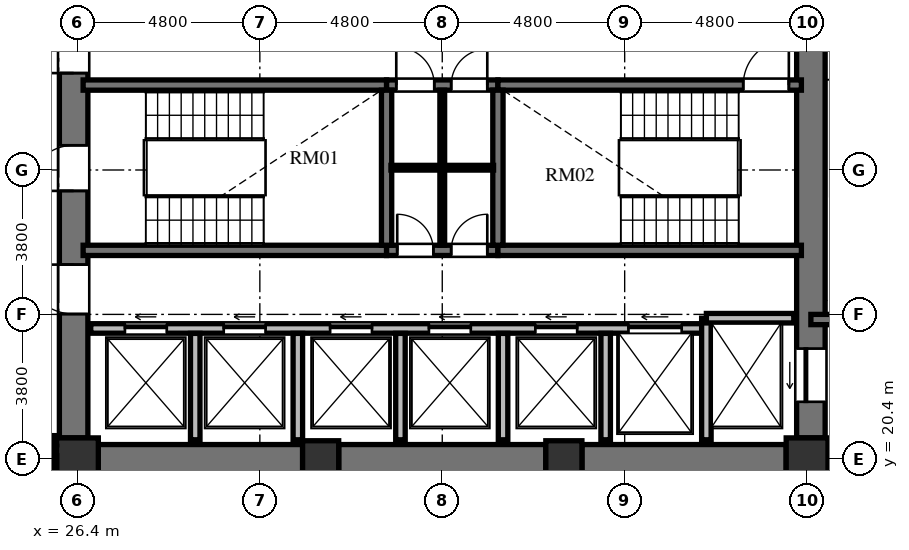
"""IFC4 building model, lengths in metres.
Left out: names, types, materials, properties, quantities, classifications, styles, units other than length and angle.
Written with IfcOpenShell. Run it as: python <this file> out.ifc"""

import sys

from ifc_helpers import new_model, si_unit, direction, frame, frame_2d, origin, origin_2d, place, context, subcontext, project, spatial, rectangle, extrude, element, fill, save


model = new_model("IFC4")
c1 = context("Model", 3, precision=1e-05, world=origin(), true_north=direction((0.0, 1.0)))
c2 = subcontext(c1, "Body", "Model", "MODEL_VIEW")
j1 = project(units=[si_unit("LENGTHUNIT", "METRE"), si_unit("PLANEANGLEUNIT", "RADIAN")], contexts=[c1])
p1 = place(None, origin())
s1 = spatial("IfcSite", under=j1, at=p1, CompositionType="ELEMENT")
p2 = place(p1, origin())
s2 = spatial("IfcBuilding", under=s1, at=p2, CompositionType="ELEMENT")
p3 = place(p2, frame((0.0, 0.0, 92.688)))
s3 = spatial("IfcBuildingStorey", under=s2, at=p3, CompositionType="ELEMENT", Elevation=92.688)
p4 = place(p3, frame((26.4, 20.4, 0.0), z_axis=(0.0, 0.0, 1.0), x_axis=(1.0, 0.0, 0.0)))
e1 = element("IfcColumn", 1, at=p4, inside=s3, PredefinedType="COLUMN", context=c2, shape_type="SweptSolid", body=[
    extrude(rectangle(XDim=1.1, YDim=1.1, at=origin_2d()), origin(), (0.0, 0.0, 1.0), 3.648),
])
for number, where, z_axis, x_axis in (
    (2, (32.8, 20.4, 0.0), (0.0, 0.0, 1.0), (1.0, 0.0, 0.0)),
    (3, (39.2, 20.4, 0.0), (0.0, 0.0, 1.0), (1.0, 0.0, 0.0)),
):
    element("IfcColumn", number, at=place(p3, frame(where, z_axis=z_axis, x_axis=x_axis)), inside=s3, PredefinedType="COLUMN", context=c2, shape_type="SweptSolid", body=[
        extrude(rectangle(XDim=0.95, YDim=0.95, at=origin_2d()), origin(), (0.0, 0.0, 1.0), 3.648),
    ])
p5 = place(p3, frame((45.6, 20.4, 0.0), z_axis=(0.0, 0.0, 1.0), x_axis=(1.0, 0.0, 0.0)))
e4 = element("IfcColumn", 4, at=p5, inside=s3, PredefinedType="COLUMN", context=c2, shape_type="SweptSolid", body=[
    extrude(rectangle(XDim=1.1, YDim=1.1, at=origin_2d()), origin(), (0.0, 0.0, 1.0), 3.648),
])
p6 = place(p3, frame((26.3, 20.95, 0.0), z_axis=(0.0, 0.0, 1.0), x_axis=(0.0, 1.0, 0.0)))
e5 = element("IfcWall", 5, at=p6, inside=s3, PredefinedType="SHEAR", context=c2, shape_type="SweptSolid", body=[
    extrude(rectangle(XDim=14.1, YDim=0.75, at=frame_2d((7.05, 0.0))), origin(), (0.0, 0.0, 1.0), 3.648),
])
p7 = place(p6, frame((6.5, 0.0, 0.0)))
e6 = element("IfcOpeningElement", 6, at=p7, cuts=e5, PredefinedType="OPENING", context=c2, shape_type="SweptSolid", body=[
    extrude(rectangle(XDim=1.2, YDim=2.15, at=frame_2d((0.6, 1.075))), frame((0.0, 0.385, 0.0), z_axis=(0.0, -1.0, 0.0), x_axis=(1.0, 0.0, 0.0)), (0.0, 0.0, 1.0), 0.77),
])
p8 = place(p6, frame((9.6, 0.0, 0.0)))
e7 = element("IfcOpeningElement", 7, at=p8, cuts=e5, PredefinedType="OPENING", context=c2, shape_type="SweptSolid", body=[
    extrude(rectangle(XDim=1.3, YDim=2.2, at=frame_2d((0.65, 1.1))), frame((0.0, 0.385, 0.0), z_axis=(0.0, -1.0, 0.0), x_axis=(1.0, 0.0, 0.0)), (0.0, 0.0, 1.0), 0.77),
])
p9 = place(p6, frame((3.26, 0.0, 0.0)))
e8 = element("IfcOpeningElement", 8, at=p9, cuts=e5, PredefinedType="OPENING", context=c2, shape_type="SweptSolid", body=[
    extrude(rectangle(XDim=1.3, YDim=2.2, at=frame_2d((0.65, 1.1))), frame((0.0, 0.385, 0.0), z_axis=(0.0, -1.0, 0.0), x_axis=(1.0, 0.0, 0.0)), (0.0, 0.0, 1.0), 0.77),
])
p10 = place(p3, frame((45.7, 20.95, 0.0), z_axis=(0.0, 0.0, 1.0), x_axis=(0.0, 1.0, 0.0)))
e9 = element("IfcWall", 9, at=p10, inside=s3, PredefinedType="SHEAR", context=c2, shape_type="SweptSolid", body=[
    extrude(rectangle(XDim=14.1, YDim=0.75, at=frame_2d((7.05, 0.0))), origin(), (0.0, 0.0, 1.0), 3.648),
])
p11 = place(p10, frame((11.75, 0.0, 0.0)))
e10 = element("IfcOpeningElement", 10, at=p11, cuts=e9, PredefinedType="OPENING", context=c2, shape_type="SweptSolid", body=[
    extrude(rectangle(XDim=1.4, YDim=2.3, at=frame_2d((0.7, 1.15))), frame((0.0, 0.385, 0.0), z_axis=(0.0, -1.0, 0.0), x_axis=(1.0, 0.0, 0.0)), (0.0, 0.0, 1.0), 0.77),
])
p12 = place(p10, frame((0.95, 0.0, 0.0)))
e11 = element("IfcOpeningElement", 11, at=p12, cuts=e9, PredefinedType="OPENING", context=c2, shape_type="SweptSolid", body=[
    extrude(rectangle(XDim=1.4, YDim=2.3, at=frame_2d((0.7, 1.15))), frame((0.0, 0.385, 0.0), z_axis=(0.0, -1.0, 0.0), x_axis=(1.0, 0.0, 0.0)), (0.0, 0.0, 1.0), 0.77),
])
p13 = place(p3, frame((26.95, 20.4, 0.0), z_axis=(0.0, 0.0, 1.0), x_axis=(1.0, 0.0, 0.0)))
e12 = element("IfcWall", 12, at=p13, inside=s3, PredefinedType="SHEAR", context=c2, shape_type="SweptSolid", body=[
    extrude(rectangle(XDim=5.375, YDim=0.75, at=frame_2d((2.688, 0.0))), origin(), (0.0, 0.0, 1.0), 3.648),
])
p14 = place(p3, frame((33.275, 20.4, 0.0), z_axis=(0.0, 0.0, 1.0), x_axis=(1.0, 0.0, 0.0)))
e13 = element("IfcWall", 13, at=p14, inside=s3, PredefinedType="SHEAR", context=c2, shape_type="SweptSolid", body=[
    extrude(rectangle(XDim=5.45, YDim=0.75, at=frame_2d((2.725, 0.0))), origin(), (0.0, 0.0, 1.0), 3.648),
])
p15 = place(p3, frame((39.675, 20.4, 0.0), z_axis=(0.0, 0.0, 1.0), x_axis=(1.0, 0.0, 0.0)))
e14 = element("IfcWall", 14, at=p15, inside=s3, PredefinedType="SHEAR", context=c2, shape_type="SweptSolid", body=[
    extrude(rectangle(XDim=5.375, YDim=0.75, at=frame_2d((2.688, 0.0))), origin(), (0.0, 0.0, 1.0), 3.648),
])
p16 = place(p3, frame((26.55, 30.235, 0.0), z_axis=(0.0, 0.0, 1.0), x_axis=(1.0, 0.0, 0.0)))
e15 = element("IfcWall", 15, at=p16, inside=s3, PredefinedType="SHEAR", context=c2, shape_type="SweptSolid", body=[
    extrude(rectangle(XDim=7.985, YDim=0.27, at=frame_2d((3.992, 0.0))), origin(), (0.0, 0.0, 1.0), 3.648),
])
p17 = place(p3, frame((34.535, 30.235, 0.0), z_axis=(0.0, 0.0, 1.0), x_axis=(1.0, 0.0, 0.0)))
e16 = element("IfcWall", 16, at=p17, inside=s3, PredefinedType="SHEAR", context=c2, shape_type="SweptSolid", body=[
    extrude(rectangle(XDim=2.93, YDim=0.27, at=frame_2d((1.465, 0.0))), origin(), (0.0, 0.0, 1.0), 3.648),
])
p18 = place(p17, frame((0.255, 0.0, 0.0)))
e17 = element("IfcOpeningElement", 17, at=p18, cuts=e16, PredefinedType="OPENING", context=c2, shape_type="SweptSolid", body=[
    extrude(rectangle(XDim=1.0, YDim=2.1, at=frame_2d((0.5, 1.05))), frame((0.0, 0.145, 0.0), z_axis=(0.0, -1.0, 0.0), x_axis=(1.0, 0.0, 0.0)), (0.0, 0.0, 1.0), 0.29),
])
p19 = place(p17, frame((1.7, 0.0, 0.0)))
e18 = element("IfcOpeningElement", 18, at=p19, cuts=e16, PredefinedType="OPENING", context=c2, shape_type="SweptSolid", body=[
    extrude(rectangle(XDim=0.95, YDim=2.1, at=frame_2d((0.475, 1.05))), frame((0.0, 0.145, 0.0), z_axis=(0.0, -1.0, 0.0), x_axis=(1.0, 0.0, 0.0)), (0.0, 0.0, 1.0), 0.29),
])
p20 = place(p3, frame((37.465, 30.235, 0.0), z_axis=(0.0, 0.0, 1.0), x_axis=(1.0, 0.0, 0.0)))
e19 = element("IfcWall", 19, at=p20, inside=s3, PredefinedType="SHEAR", context=c2, shape_type="SweptSolid", body=[
    extrude(rectangle(XDim=7.985, YDim=0.27, at=frame_2d((3.992, 0.0))), origin(), (0.0, 0.0, 1.0), 3.648),
])
p21 = place(p20, frame((6.455, 0.0, 0.0)))
e20 = element("IfcOpeningElement", 20, at=p21, cuts=e19, PredefinedType="OPENING", context=c2, shape_type="SweptSolid", body=[
    extrude(rectangle(XDim=1.2, YDim=2.15, at=frame_2d((0.6, 1.075))), frame((0.0, 0.145, 0.0), z_axis=(0.0, -1.0, 0.0), x_axis=(1.0, 0.0, 0.0)), (0.0, 0.0, 1.0), 0.29),
])
p22 = place(p3, frame((26.55, 25.885, 0.0), z_axis=(0.0, 0.0, 1.0), x_axis=(1.0, 0.0, 0.0)))
e21 = element("IfcWall", 21, at=p22, inside=s3, PredefinedType="SHEAR", context=c2, shape_type="SweptSolid", body=[
    extrude(rectangle(XDim=7.985, YDim=0.27, at=frame_2d((3.992, 0.0))), origin(), (0.0, 0.0, 1.0), 3.648),
])
p23 = place(p3, frame((34.535, 25.885, 0.0), z_axis=(0.0, 0.0, 1.0), x_axis=(1.0, 0.0, 0.0)))
e22 = element("IfcWall", 22, at=p23, inside=s3, PredefinedType="SHEAR", context=c2, shape_type="SweptSolid", body=[
    extrude(rectangle(XDim=2.93, YDim=0.27, at=frame_2d((1.465, 0.0))), origin(), (0.0, 0.0, 1.0), 3.648),
])
p24 = place(p23, frame((0.28, 0.0, 0.0)))
e23 = element("IfcOpeningElement", 23, at=p24, cuts=e22, PredefinedType="OPENING", context=c2, shape_type="SweptSolid", body=[
    extrude(rectangle(XDim=0.95, YDim=2.1, at=frame_2d((0.475, 1.05))), frame((0.0, 0.145, 0.0), z_axis=(0.0, -1.0, 0.0), x_axis=(1.0, 0.0, 0.0)), (0.0, 0.0, 1.0), 0.29),
])
p25 = place(p23, frame((1.7, 0.0, 0.0)))
e24 = element("IfcOpeningElement", 24, at=p25, cuts=e22, PredefinedType="OPENING", context=c2, shape_type="SweptSolid", body=[
    extrude(rectangle(XDim=0.95, YDim=2.1, at=frame_2d((0.475, 1.05))), frame((0.0, 0.145, 0.0), z_axis=(0.0, -1.0, 0.0), x_axis=(1.0, 0.0, 0.0)), (0.0, 0.0, 1.0), 0.29),
])
p26 = place(p3, frame((37.465, 25.885, 0.0), z_axis=(0.0, 0.0, 1.0), x_axis=(1.0, 0.0, 0.0)))
e25 = element("IfcWall", 25, at=p26, inside=s3, PredefinedType="SHEAR", context=c2, shape_type="SweptSolid", body=[
    extrude(rectangle(XDim=7.985, YDim=0.27, at=frame_2d((3.992, 0.0))), origin(), (0.0, 0.0, 1.0), 3.648),
])
for number, where, z_axis, x_axis in (
    (26, (34.535, 26.02, 0.0), (0.0, 0.0, 1.0), (0.0, 1.0, 0.0)),
    (27, (37.465, 26.02, 0.0), (0.0, 0.0, 1.0), (0.0, 1.0, 0.0)),
):
    element("IfcWall", number, at=place(p3, frame(where, z_axis=z_axis, x_axis=x_axis)), inside=s3, PredefinedType="SHEAR", context=c2, shape_type="SweptSolid", body=[
        extrude(rectangle(XDim=4.08, YDim=0.27, at=frame_2d((2.04, 0.0))), origin(), (0.0, 0.0, 1.0), 3.648),
    ])
p27 = place(p3, frame((34.65, 28.06, 0.0), z_axis=(0.0, 0.0, 1.0), x_axis=(1.0, 0.0, 0.0)))
e28 = element("IfcWall", 28, at=p27, inside=s3, PredefinedType="PARTITIONING", context=c2, shape_type="SweptSolid", body=[
    extrude(rectangle(XDim=2.7, YDim=0.125, at=frame_2d((1.35, 0.0))), origin(), (0.0, 0.0, 1.0), 3.428),
])
p28 = place(p3, frame((36.0, 26.02, 0.0), z_axis=(0.0, 0.0, 1.0), x_axis=(0.0, 1.0, 0.0)))
e29 = element("IfcWall", 29, at=p28, inside=s3, PredefinedType="PARTITIONING", context=c2, shape_type="SweptSolid", body=[
    extrude(rectangle(XDim=4.08, YDim=0.125, at=frame_2d((2.04, 0.0))), origin(), (0.0, 0.0, 1.0), 3.428),
])
p29 = place(p3, frame((26.75, 23.83, 0.0), z_axis=(0.0, 0.0, 1.0), x_axis=(1.0, 0.0, 0.0)))
e30 = element("IfcWall", 30, at=p29, inside=s3, PredefinedType="SOLIDWALL", context=c2, shape_type="SweptSolid", body=[
    extrude(rectangle(XDim=16.2, YDim=0.25, at=frame_2d((8.1, 0.0))), origin(), (0.0, 0.0, 1.0), 3.428),
])
p30 = place(p29, frame((0.9, 0.0, 0.0)))
e31 = element("IfcOpeningElement", 31, at=p30, cuts=e30, PredefinedType="OPENING", context=c2, shape_type="SweptSolid", body=[
    extrude(rectangle(XDim=1.1, YDim=2.2, at=frame_2d((0.55, 1.1))), frame((0.0, 0.135, 0.0), z_axis=(0.0, -1.0, 0.0), x_axis=(1.0, 0.0, 0.0)), (0.0, 0.0, 1.0), 0.27),
])
p31 = place(p29, frame((3.5, 0.0, 0.0)))
e32 = element("IfcOpeningElement", 32, at=p31, cuts=e30, PredefinedType="OPENING", context=c2, shape_type="SweptSolid", body=[
    extrude(rectangle(XDim=1.1, YDim=2.2, at=frame_2d((0.55, 1.1))), frame((0.0, 0.135, 0.0), z_axis=(0.0, -1.0, 0.0), x_axis=(1.0, 0.0, 0.0)), (0.0, 0.0, 1.0), 0.27),
])
p32 = place(p29, frame((6.3, 0.0, 0.0)))
e33 = element("IfcOpeningElement", 33, at=p32, cuts=e30, PredefinedType="OPENING", context=c2, shape_type="SweptSolid", body=[
    extrude(rectangle(XDim=1.1, YDim=2.2, at=frame_2d((0.55, 1.1))), frame((0.0, 0.135, 0.0), z_axis=(0.0, -1.0, 0.0), x_axis=(1.0, 0.0, 0.0)), (0.0, 0.0, 1.0), 0.27),
])
p33 = place(p29, frame((8.9, 0.0, 0.0)))
e34 = element("IfcOpeningElement", 34, at=p33, cuts=e30, PredefinedType="OPENING", context=c2, shape_type="SweptSolid", body=[
    extrude(rectangle(XDim=1.1, YDim=2.2, at=frame_2d((0.55, 1.1))), frame((0.0, 0.135, 0.0), z_axis=(0.0, -1.0, 0.0), x_axis=(1.0, 0.0, 0.0)), (0.0, 0.0, 1.0), 0.27),
])
p34 = place(p29, frame((11.7, 0.0, 0.0)))
e35 = element("IfcOpeningElement", 35, at=p34, cuts=e30, PredefinedType="OPENING", context=c2, shape_type="SweptSolid", body=[
    extrude(rectangle(XDim=1.1, YDim=2.2, at=frame_2d((0.55, 1.1))), frame((0.0, 0.135, 0.0), z_axis=(0.0, -1.0, 0.0), x_axis=(1.0, 0.0, 0.0)), (0.0, 0.0, 1.0), 0.27),
])
p35 = place(p29, frame((14.15, 0.0, 0.0)))
e36 = element("IfcOpeningElement", 36, at=p35, cuts=e30, PredefinedType="OPENING", context=c2, shape_type="SweptSolid", body=[
    extrude(rectangle(XDim=1.4, YDim=2.3, at=frame_2d((0.7, 1.15))), frame((0.0, 0.135, 0.0), z_axis=(0.0, -1.0, 0.0), x_axis=(1.0, 0.0, 0.0)), (0.0, 0.0, 1.0), 0.27),
])
p36 = place(p3, frame((42.95, 20.9, 0.0), z_axis=(0.0, 0.0, 1.0), x_axis=(0.0, 1.0, 0.0)))
e37 = element("IfcWall", 37, at=p36, inside=s3, PredefinedType="SOLIDWALL", context=c2, shape_type="SweptSolid", body=[
    extrude(rectangle(XDim=3.2, YDim=0.25, at=frame_2d((1.6, 0.0))), origin(), (0.0, 0.0, 1.0), 3.428),
])
p37 = place(p3, frame((42.95, 24.1, 0.0), z_axis=(0.0, 0.0, 1.0), x_axis=(1.0, 0.0, 0.0)))
e38 = element("IfcWall", 38, at=p37, inside=s3, PredefinedType="SOLIDWALL", context=c2, shape_type="SweptSolid", body=[
    extrude(rectangle(XDim=2.3, YDim=0.25, at=frame_2d((1.15, 0.0))), origin(), (0.0, 0.0, 1.0), 3.428),
])
for number, where, z_axis, x_axis in (
    (39, (29.5, 20.9, 0.0), (0.0, 0.0, 1.0), (0.0, 1.0, 0.0)),
    (40, (32.2, 20.9, 0.0), (0.0, 0.0, 1.0), (0.0, 1.0, 0.0)),
    (41, (34.9, 20.9, 0.0), (0.0, 0.0, 1.0), (0.0, 1.0, 0.0)),
    (42, (37.6, 20.9, 0.0), (0.0, 0.0, 1.0), (0.0, 1.0, 0.0)),
    (43, (40.3, 20.9, 0.0), (0.0, 0.0, 1.0), (0.0, 1.0, 0.0)),
):
    element("IfcWall", number, at=place(p3, frame(where, z_axis=z_axis, x_axis=x_axis)), inside=s3, PredefinedType="SOLIDWALL", context=c2, shape_type="SweptSolid", body=[
        extrude(rectangle(XDim=2.8, YDim=0.25, at=frame_2d((1.4, 0.0))), origin(), (0.0, 0.0, 1.0), 3.428),
    ])
p38 = place(p3, frame((45.7, 24.065, 0.0), z_axis=(0.0, 0.0, 1.0), x_axis=(1.0, 0.0, 0.0)))
e44 = element("IfcWall", 44, at=p38, inside=s3, PredefinedType="SHEAR", context=c2, shape_type="SweptSolid", body=[
    extrude(rectangle(XDim=4.715, YDim=0.27, at=frame_2d((2.357, 0.0))), origin(), (0.0, 0.0, 1.0), 3.648),
])
p39 = place(p3, frame((45.7, 20.02, 0.0), z_axis=(0.0, 0.0, 1.0), x_axis=(1.0, 0.0, 0.0)))
e45 = element("IfcWall", 45, at=p39, inside=s3, PredefinedType="SOLIDWALL", context=c2, shape_type="SweptSolid", body=[
    extrude(rectangle(XDim=4.715, YDim=0.25, at=frame_2d((2.357, 0.0))), origin(), (0.0, 0.0, 1.0), 3.428),
])
p40 = place(p3, frame((25.83, 21.01, 0.0), z_axis=(0.0, 0.0, 1.0), x_axis=(0.0, -1.0, 0.0)))
e46 = element("IfcWall", 46, at=p40, inside=s3, PredefinedType="PARTITIONING", context=c2, shape_type="SweptSolid", body=[
    extrude(rectangle(XDim=1.22, YDim=0.18, at=frame_2d((0.61, 0.0))), origin(), (0.0, 0.0, 1.0), 3.428),
])
p41 = place(p7, origin())
e47 = element("IfcDoor", 47, at=p41, inside=s3, OperationType="SINGLE_SWING_LEFT", PredefinedType="DOOR", context=c2, shape_type="SweptSolid", body=[
    extrude(rectangle(XDim=1.2, YDim=2.15, at=frame_2d((0.6, 1.075))), frame((0.0, 0.025, 0.0), z_axis=(0.0, -1.0, 0.0), x_axis=(1.0, 0.0, 0.0)), (0.0, 0.0, 1.0), 0.05),
])
fill(e6, e47)
p42 = place(p21, origin())
e48 = element("IfcDoor", 48, at=p42, inside=s3, OperationType="SINGLE_SWING_RIGHT", PredefinedType="DOOR", context=c2, shape_type="SweptSolid", body=[
    extrude(rectangle(XDim=1.2, YDim=2.15, at=frame_2d((0.6, 1.075))), frame((0.0, 0.025, 0.0), z_axis=(0.0, -1.0, 0.0), x_axis=(1.0, 0.0, 0.0)), (0.0, 0.0, 1.0), 0.05),
])
fill(e20, e48)
p43 = place(p24, origin())
e49 = element("IfcDoor", 49, at=p43, inside=s3, OperationType="SINGLE_SWING_LEFT", PredefinedType="DOOR", context=c2, shape_type="SweptSolid", body=[
    extrude(rectangle(XDim=0.95, YDim=2.1, at=frame_2d((0.475, 1.05))), frame((0.0, 0.025, 0.0), z_axis=(0.0, -1.0, 0.0), x_axis=(1.0, 0.0, 0.0)), (0.0, 0.0, 1.0), 0.05),
])
fill(e23, e49)
p44 = place(p25, origin())
e50 = element("IfcDoor", 50, at=p44, inside=s3, OperationType="SINGLE_SWING_RIGHT", PredefinedType="DOOR", context=c2, shape_type="SweptSolid", body=[
    extrude(rectangle(XDim=0.95, YDim=2.1, at=frame_2d((0.475, 1.05))), frame((0.0, 0.025, 0.0), z_axis=(0.0, -1.0, 0.0), x_axis=(1.0, 0.0, 0.0)), (0.0, 0.0, 1.0), 0.05),
])
fill(e24, e50)
p45 = place(p18, origin())
e51 = element("IfcDoor", 51, at=p45, inside=s3, OperationType="SINGLE_SWING_LEFT", PredefinedType="DOOR", context=c2, shape_type="SweptSolid", body=[
    extrude(rectangle(XDim=1.0, YDim=2.1, at=frame_2d((0.5, 1.05))), frame((0.0, 0.025, 0.0), z_axis=(0.0, -1.0, 0.0), x_axis=(1.0, 0.0, 0.0)), (0.0, 0.0, 1.0), 0.05),
])
fill(e17, e51)
p46 = place(p19, origin())
e52 = element("IfcDoor", 52, at=p46, inside=s3, OperationType="SINGLE_SWING_RIGHT", PredefinedType="DOOR", context=c2, shape_type="SweptSolid", body=[
    extrude(rectangle(XDim=0.95, YDim=2.1, at=frame_2d((0.475, 1.05))), frame((0.0, 0.025, 0.0), z_axis=(0.0, -1.0, 0.0), x_axis=(1.0, 0.0, 0.0)), (0.0, 0.0, 1.0), 0.05),
])
fill(e18, e52)
p47 = place(p8, origin())
e53 = element("IfcDoor", 53, at=p47, inside=s3, OperationType="SINGLE_SWING_LEFT", PredefinedType="DOOR", context=c2, shape_type="SweptSolid", body=[
    extrude(rectangle(XDim=1.3, YDim=2.2, at=frame_2d((0.65, 1.1))), frame((0.0, 0.025, 0.0), z_axis=(0.0, -1.0, 0.0), x_axis=(1.0, 0.0, 0.0)), (0.0, 0.0, 1.0), 0.05),
])
fill(e7, e53)
p48 = place(p9, origin())
e54 = element("IfcDoor", 54, at=p48, inside=s3, OperationType="SINGLE_SWING_RIGHT", PredefinedType="DOOR", context=c2, shape_type="SweptSolid", body=[
    extrude(rectangle(XDim=1.3, YDim=2.2, at=frame_2d((0.65, 1.1))), frame((0.0, 0.025, 0.0), z_axis=(0.0, -1.0, 0.0), x_axis=(1.0, 0.0, 0.0)), (0.0, 0.0, 1.0), 0.05),
])
fill(e8, e54)
p49 = place(p30, origin())
e55 = element("IfcDoor", 55, at=p49, inside=s3, OperationType="SLIDING_TO_LEFT", PredefinedType="DOOR", context=c2, shape_type="SweptSolid", body=[
    extrude(rectangle(XDim=1.1, YDim=2.2, at=frame_2d((0.55, 1.1))), frame((0.0, 0.025, 0.0), z_axis=(0.0, -1.0, 0.0), x_axis=(1.0, 0.0, 0.0)), (0.0, 0.0, 1.0), 0.05),
])
fill(e31, e55)
p50 = place(p31, origin())
e56 = element("IfcDoor", 56, at=p50, inside=s3, OperationType="SLIDING_TO_LEFT", PredefinedType="DOOR", context=c2, shape_type="SweptSolid", body=[
    extrude(rectangle(XDim=1.1, YDim=2.2, at=frame_2d((0.55, 1.1))), frame((0.0, 0.025, 0.0), z_axis=(0.0, -1.0, 0.0), x_axis=(1.0, 0.0, 0.0)), (0.0, 0.0, 1.0), 0.05),
])
fill(e32, e56)
p51 = place(p32, origin())
e57 = element("IfcDoor", 57, at=p51, inside=s3, OperationType="SLIDING_TO_LEFT", PredefinedType="DOOR", context=c2, shape_type="SweptSolid", body=[
    extrude(rectangle(XDim=1.1, YDim=2.2, at=frame_2d((0.55, 1.1))), frame((0.0, 0.025, 0.0), z_axis=(0.0, -1.0, 0.0), x_axis=(1.0, 0.0, 0.0)), (0.0, 0.0, 1.0), 0.05),
])
fill(e33, e57)
p52 = place(p33, origin())
e58 = element("IfcDoor", 58, at=p52, inside=s3, OperationType="SLIDING_TO_LEFT", PredefinedType="DOOR", context=c2, shape_type="SweptSolid", body=[
    extrude(rectangle(XDim=1.1, YDim=2.2, at=frame_2d((0.55, 1.1))), frame((0.0, 0.025, 0.0), z_axis=(0.0, -1.0, 0.0), x_axis=(1.0, 0.0, 0.0)), (0.0, 0.0, 1.0), 0.05),
])
fill(e34, e58)
p53 = place(p34, origin())
e59 = element("IfcDoor", 59, at=p53, inside=s3, OperationType="SLIDING_TO_LEFT", PredefinedType="DOOR", context=c2, shape_type="SweptSolid", body=[
    extrude(rectangle(XDim=1.1, YDim=2.2, at=frame_2d((0.55, 1.1))), frame((0.0, 0.025, 0.0), z_axis=(0.0, -1.0, 0.0), x_axis=(1.0, 0.0, 0.0)), (0.0, 0.0, 1.0), 0.05),
])
fill(e35, e59)
p54 = place(p12, origin())
e60 = element("IfcDoor", 60, at=p54, inside=s3, OperationType="SLIDING_TO_LEFT", PredefinedType="DOOR", context=c2, shape_type="SweptSolid", body=[
    extrude(rectangle(XDim=1.4, YDim=2.3, at=frame_2d((0.7, 1.15))), frame((0.0, 0.025, 0.0), z_axis=(0.0, -1.0, 0.0), x_axis=(1.0, 0.0, 0.0)), (0.0, 0.0, 1.0), 0.05),
])
fill(e11, e60)
p55 = place(p35, origin())
e61 = element("IfcDoor", 61, at=p55, inside=s3, OperationType="SLIDING_TO_LEFT", PredefinedType="DOOR", context=c2, shape_type="SweptSolid", body=[
    extrude(rectangle(XDim=1.4, YDim=2.3, at=frame_2d((0.7, 1.15))), frame((0.0, 0.025, 0.0), z_axis=(0.0, -1.0, 0.0), x_axis=(1.0, 0.0, 0.0)), (0.0, 0.0, 1.0), 0.05),
])
fill(e36, e61)
save(model, sys.argv[1])
